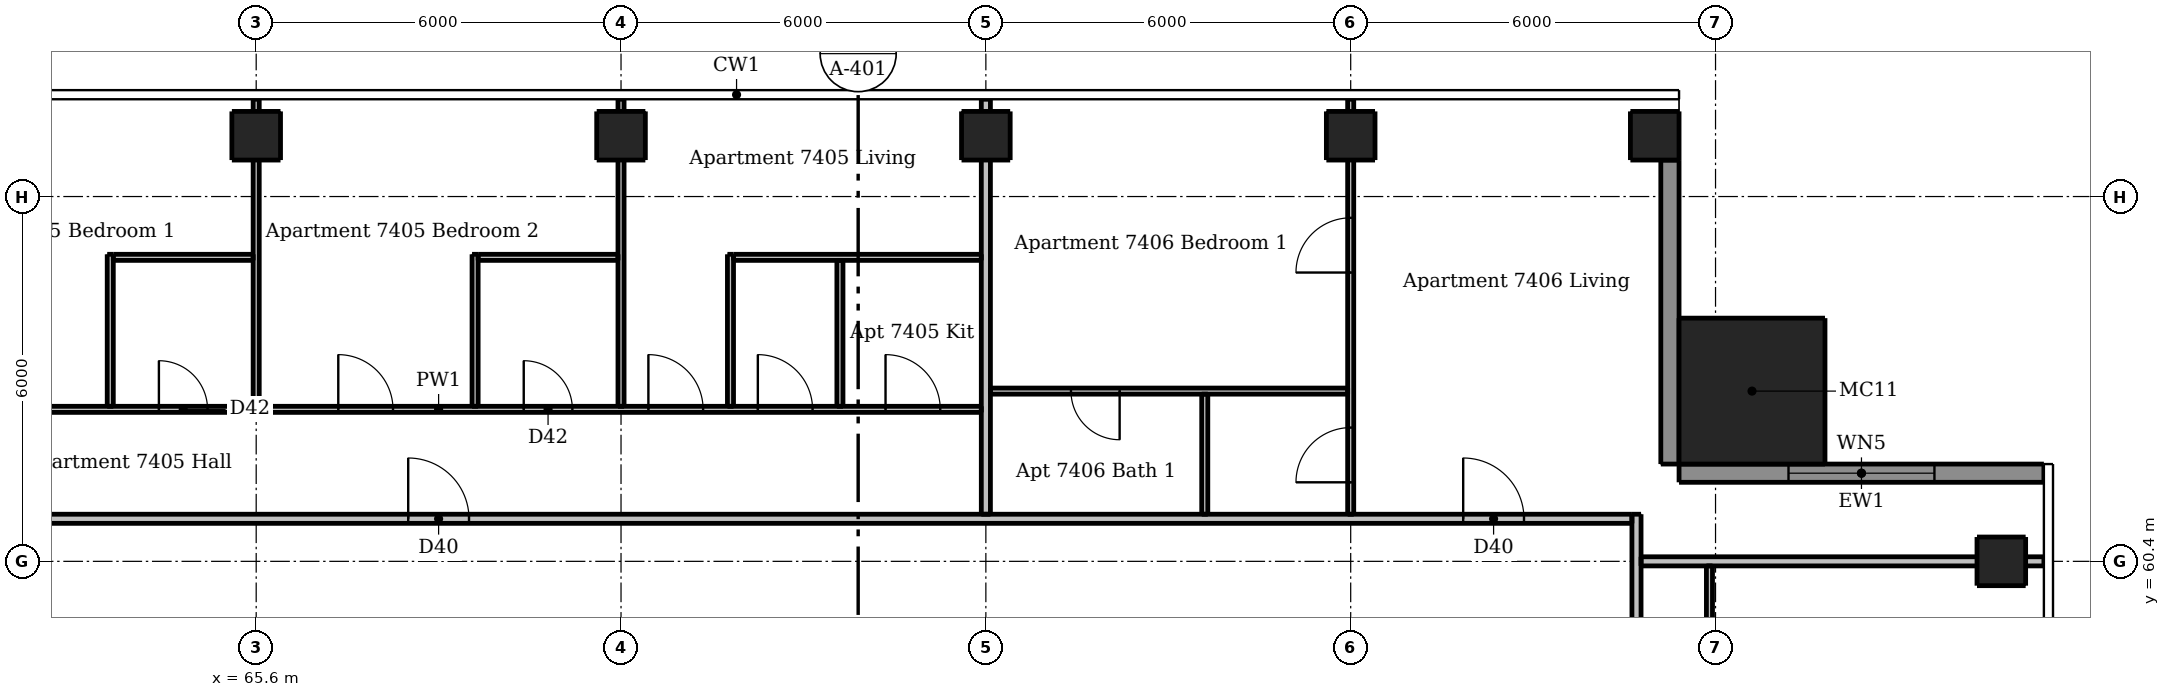
"""IFC4 building model, lengths in metres.
Left out: names, types, materials, properties, quantities, classifications, styles, units other than length and angle.
Written with IfcOpenShell. Run it as: python <this file> out.ifc"""

import sys

from ifc_helpers import new_model, si_unit, direction, frame, frame_2d, origin, origin_2d, place, context, subcontext, project, spatial, rectangle, extrude, element, fill, save


model = new_model("IFC4")
c1 = context("Model", 3, precision=1e-05, world=origin(), true_north=direction((0.0, 1.0)))
c2 = subcontext(c1, "Body", "Model", "MODEL_VIEW")
j1 = project(units=[si_unit("LENGTHUNIT", "METRE"), si_unit("PLANEANGLEUNIT", "RADIAN")], contexts=[c1])
p1 = place(None, origin())
s1 = spatial("IfcSite", under=j1, at=p1, CompositionType="ELEMENT")
p2 = place(p1, origin())
s2 = spatial("IfcBuilding", under=s1, at=p2, CompositionType="ELEMENT")
p3 = place(p2, frame((0.0, 0.0, 275.2)))
s3 = spatial("IfcBuildingStorey", under=s2, at=p3, CompositionType="ELEMENT", Elevation=275.2)
for number, where, z_axis, x_axis in (
    (1, (94.3, 60.4, 0.0), (0.0, 0.0, 1.0), (1.0, 0.0, 0.0)),
    (2, (65.6, 67.4, 0.0), (0.0, 0.0, 1.0), (1.0, 0.0, 0.0)),
    (3, (71.6, 67.4, 0.0), (0.0, 0.0, 1.0), (1.0, 0.0, 0.0)),
    (4, (77.6, 67.4, 0.0), (0.0, 0.0, 1.0), (1.0, 0.0, 0.0)),
    (5, (83.6, 67.4, 0.0), (0.0, 0.0, 1.0), (1.0, 0.0, 0.0)),
    (6, (88.6, 67.4, 0.0), (0.0, 0.0, 1.0), (1.0, 0.0, 0.0)),
):
    element("IfcColumn", number, at=place(p3, frame(where, z_axis=z_axis, x_axis=x_axis)), inside=s3, PredefinedType="COLUMN", context=c2, shape_type="SweptSolid", body=[
        extrude(rectangle(XDim=0.8, YDim=0.8, at=origin_2d()), origin(), (0.0, 0.0, 1.0), 3.05),
    ])
p4 = place(p3, frame((90.2, 63.2, 0.0), z_axis=(0.0, 0.0, 1.0), x_axis=(1.0, 0.0, 0.0)))
e7 = element("IfcColumn", 7, at=p4, inside=s3, PredefinedType="COLUMN", context=c2, shape_type="SweptSolid", body=[
    extrude(rectangle(XDim=2.4, YDim=2.4, at=origin_2d()), origin(), (0.0, 0.0, 1.0), 3.3),
])
p5 = place(p3, frame((95.0, 61.85, 0.0), z_axis=(0.0, 0.0, 1.0), x_axis=(-1.0, 0.0, 0.0)))
e8 = element("IfcWall", 8, at=p5, inside=s3, PredefinedType="SOLIDWALL", context=c2, shape_type="SweptSolid", body=[
    extrude(rectangle(XDim=6.0, YDim=0.3, at=frame_2d((3.0, 0.0))), origin(), (0.0, 0.0, 1.0), 3.05),
])
p6 = place(p5, frame((1.8, 0.0, 0.15)))
e9 = element("IfcOpeningElement", 9, at=p6, cuts=e8, PredefinedType="OPENING", context=c2, shape_type="SweptSolid", body=[
    extrude(rectangle(XDim=2.4, YDim=2.1, at=frame_2d((1.2, 1.05))), frame((0.0, 0.16, 0.0), z_axis=(0.0, -1.0, 0.0), x_axis=(1.0, 0.0, 0.0)), (0.0, 0.0, 1.0), 0.32),
])
p7 = place(p3, frame((88.85, 62.0, 0.0), z_axis=(0.0, 0.0, 1.0), x_axis=(0.0, 1.0, 0.0)))
e10 = element("IfcWall", 10, at=p7, inside=s3, PredefinedType="SOLIDWALL", context=c2, shape_type="SweptSolid", body=[
    extrude(rectangle(XDim=5.0, YDim=0.3, at=frame_2d((2.5, 0.0))), origin(), (0.0, 0.0, 1.0), 3.05),
])
p8 = place(p3, frame((63.2, 62.95, 0.0), z_axis=(0.0, 0.0, 1.0), x_axis=(0.0, 1.0, 0.0)))
e11 = element("IfcWall", 11, at=p8, inside=s3, PredefinedType="PARTITIONING", context=c2, shape_type="SweptSolid", body=[
    extrude(rectangle(XDim=2.5, YDim=0.1, at=frame_2d((1.25, 0.0))), origin(), (0.0, 0.0, 1.0), 3.05),
])
p9 = place(p3, frame((65.6, 62.95, 0.0), z_axis=(0.0, 0.0, 1.0), x_axis=(0.0, 1.0, 0.0)))
e12 = element("IfcWall", 12, at=p9, inside=s3, PredefinedType="PARTITIONING", context=c2, shape_type="SweptSolid", body=[
    extrude(rectangle(XDim=5.05, YDim=0.1, at=frame_2d((2.525, 0.0))), origin(), (0.0, 0.0, 1.0), 2.516),
])
p10 = place(p3, frame((69.2, 62.95, 0.0), z_axis=(0.0, 0.0, 1.0), x_axis=(0.0, 1.0, 0.0)))
e13 = element("IfcWall", 13, at=p10, inside=s3, PredefinedType="PARTITIONING", context=c2, shape_type="SweptSolid", body=[
    extrude(rectangle(XDim=2.5, YDim=0.1, at=frame_2d((1.25, 0.0))), origin(), (0.0, 0.0, 1.0), 3.05),
])
p11 = place(p3, frame((71.6, 62.95, 0.0), z_axis=(0.0, 0.0, 1.0), x_axis=(0.0, 1.0, 0.0)))
e14 = element("IfcWall", 14, at=p11, inside=s3, PredefinedType="PARTITIONING", context=c2, shape_type="SweptSolid", body=[
    extrude(rectangle(XDim=5.05, YDim=0.1, at=frame_2d((2.525, 0.0))), origin(), (0.0, 0.0, 1.0), 2.516),
])
p12 = place(p3, frame((73.4, 62.95, 0.0), z_axis=(0.0, 0.0, 1.0), x_axis=(0.0, 1.0, 0.0)))
e15 = element("IfcWall", 15, at=p12, inside=s3, PredefinedType="PARTITIONING", context=c2, shape_type="SweptSolid", body=[
    extrude(rectangle(XDim=2.5, YDim=0.1, at=frame_2d((1.25, 0.0))), origin(), (0.0, 0.0, 1.0), 3.05),
])
p13 = place(p3, frame((75.2, 62.95, 0.0), z_axis=(0.0, 0.0, 1.0), x_axis=(0.0, 1.0, 0.0)))
e16 = element("IfcWall", 16, at=p13, inside=s3, PredefinedType="PARTITIONING", context=c2, shape_type="SweptSolid", body=[
    extrude(rectangle(XDim=2.4, YDim=0.1, at=frame_2d((1.2, 0.0))), origin(), (0.0, 0.0, 1.0), 3.05),
])
p14 = place(p3, frame((81.2, 61.175, 0.0), z_axis=(0.0, 0.0, 1.0), x_axis=(0.0, 1.0, 0.0)))
e17 = element("IfcWall", 17, at=p14, inside=s3, PredefinedType="PARTITIONING", context=c2, shape_type="SweptSolid", body=[
    extrude(rectangle(XDim=1.975, YDim=0.1, at=frame_2d((0.987, 0.0))), origin(), (0.0, 0.0, 1.0), 3.05),
])
p15 = place(p3, frame((83.6, 61.175, 0.0), z_axis=(0.0, 0.0, 1.0), x_axis=(0.0, 1.0, 0.0)))
e18 = element("IfcWall", 18, at=p15, inside=s3, PredefinedType="PARTITIONING", context=c2, shape_type="SweptSolid", body=[
    extrude(rectangle(XDim=6.825, YDim=0.1, at=frame_2d((3.413, 0.0))), origin(), (0.0, 0.0, 1.0), 2.516),
])
p16 = place(p15, frame((0.525, 0.0, 0.0)))
e19 = element("IfcOpeningElement", 19, at=p16, cuts=e18, PredefinedType="OPENING", context=c2, shape_type="SweptSolid", body=[
    extrude(rectangle(XDim=0.9, YDim=2.1, at=frame_2d((0.45, 1.05))), frame((0.0, 0.06, 0.0), z_axis=(0.0, -1.0, 0.0), x_axis=(1.0, 0.0, 0.0)), (0.0, 0.0, 1.0), 0.12),
])
p17 = place(p15, frame((3.975, 0.0, 0.0)))
e20 = element("IfcOpeningElement", 20, at=p17, cuts=e18, PredefinedType="OPENING", context=c2, shape_type="SweptSolid", body=[
    extrude(rectangle(XDim=0.9, YDim=2.1, at=frame_2d((0.45, 1.05))), frame((0.0, 0.06, 0.0), z_axis=(0.0, -1.0, 0.0), x_axis=(1.0, 0.0, 0.0)), (0.0, 0.0, 1.0), 0.12),
])
p18 = place(p3, frame((89.5, 60.325, 0.0), z_axis=(0.0, 0.0, 1.0), x_axis=(0.0, -1.0, 0.0)))
e21 = element("IfcWall", 21, at=p18, inside=s3, PredefinedType="PARTITIONING", context=c2, shape_type="SweptSolid", body=[
    extrude(rectangle(XDim=17.85, YDim=0.1, at=frame_2d((8.925, 0.0))), origin(), (0.0, 0.0, 1.0), 3.05),
])
p19 = place(p18, frame((16.575, 0.0, 0.0)))
e22 = element("IfcOpeningElement", 22, at=p19, cuts=e21, PredefinedType="OPENING", context=c2, shape_type="SweptSolid", body=[
    extrude(rectangle(XDim=0.9, YDim=2.1, at=frame_2d((0.45, 1.05))), frame((0.0, 0.06, 0.0), z_axis=(0.0, -1.0, 0.0), x_axis=(1.0, 0.0, 0.0)), (0.0, 0.0, 1.0), 0.12),
])
p20 = place(p18, frame((12.675, 0.0, 0.0)))
e23 = element("IfcOpeningElement", 23, at=p20, cuts=e21, PredefinedType="OPENING", context=c2, shape_type="SweptSolid", body=[
    extrude(rectangle(XDim=0.9, YDim=2.1, at=frame_2d((0.45, 1.05))), frame((0.0, 0.06, 0.0), z_axis=(0.0, -1.0, 0.0), x_axis=(1.0, 0.0, 0.0)), (0.0, 0.0, 1.0), 0.12),
])
p21 = place(p18, frame((14.775, 0.0, 0.0)))
e24 = element("IfcOpeningElement", 24, at=p21, cuts=e21, PredefinedType="OPENING", context=c2, shape_type="SweptSolid", body=[
    extrude(rectangle(XDim=0.9, YDim=2.1, at=frame_2d((0.45, 1.05))), frame((0.0, 0.06, 0.0), z_axis=(0.0, -1.0, 0.0), x_axis=(1.0, 0.0, 0.0)), (0.0, 0.0, 1.0), 0.12),
])
p22 = place(p18, frame((7.275, 0.0, 0.0)))
e25 = element("IfcOpeningElement", 25, at=p22, cuts=e21, PredefinedType="OPENING", context=c2, shape_type="SweptSolid", body=[
    extrude(rectangle(XDim=0.9, YDim=2.1, at=frame_2d((0.45, 1.05))), frame((0.0, 0.06, 0.0), z_axis=(0.0, -1.0, 0.0), x_axis=(1.0, 0.0, 0.0)), (0.0, 0.0, 1.0), 0.12),
])
p23 = place(p18, frame((1.275, 0.0, 0.0)))
e26 = element("IfcOpeningElement", 26, at=p23, cuts=e21, PredefinedType="OPENING", context=c2, shape_type="SweptSolid", body=[
    extrude(rectangle(XDim=0.9, YDim=2.1, at=frame_2d((0.45, 1.05))), frame((0.0, 0.06, 0.0), z_axis=(0.0, -1.0, 0.0), x_axis=(1.0, 0.0, 0.0)), (0.0, 0.0, 1.0), 0.12),
])
p24 = place(p18, frame((10.325, 0.0, 0.0)))
e27 = element("IfcOpeningElement", 27, at=p24, cuts=e21, PredefinedType="OPENING", context=c2, shape_type="SweptSolid", body=[
    extrude(rectangle(XDim=0.8, YDim=2.1, at=frame_2d((0.4, 1.05))), frame((0.0, 0.06, 0.0), z_axis=(0.0, -1.0, 0.0), x_axis=(1.0, 0.0, 0.0)), (0.0, 0.0, 1.0), 0.12),
])
p25 = place(p18, frame((4.325, 0.0, 0.0)))
e28 = element("IfcOpeningElement", 28, at=p25, cuts=e21, PredefinedType="OPENING", context=c2, shape_type="SweptSolid", body=[
    extrude(rectangle(XDim=0.8, YDim=2.1, at=frame_2d((0.4, 1.05))), frame((0.0, 0.06, 0.0), z_axis=(0.0, -1.0, 0.0), x_axis=(1.0, 0.0, 0.0)), (0.0, 0.0, 1.0), 0.12),
])
for number, where, z_axis, x_axis in (
    (29, (63.25, 65.4, 0.0), (0.0, 0.0, 1.0), (1.0, 0.0, 0.0)),
    (30, (69.25, 65.4, 0.0), (0.0, 0.0, 1.0), (1.0, 0.0, 0.0)),
):
    element("IfcWall", number, at=place(p3, frame(where, z_axis=z_axis, x_axis=x_axis)), inside=s3, PredefinedType="PARTITIONING", context=c2, shape_type="SweptSolid", body=[
        extrude(rectangle(XDim=2.3, YDim=0.1, at=frame_2d((1.15, 0.0))), origin(), (0.0, 0.0, 1.0), 3.05),
    ])
p26 = place(p3, frame((73.45, 65.4, 0.0), z_axis=(0.0, 0.0, 1.0), x_axis=(1.0, 0.0, 0.0)))
e31 = element("IfcWall", 31, at=p26, inside=s3, PredefinedType="PARTITIONING", context=c2, shape_type="SweptSolid", body=[
    extrude(rectangle(XDim=4.075, YDim=0.1, at=frame_2d((2.038, 0.0))), origin(), (0.0, 0.0, 1.0), 3.05),
])
p27 = place(p3, frame((83.55, 63.2, 0.0), z_axis=(0.0, 0.0, 1.0), x_axis=(-1.0, 0.0, 0.0)))
e32 = element("IfcWall", 32, at=p27, inside=s3, PredefinedType="PARTITIONING", context=c2, shape_type="SweptSolid", body=[
    extrude(rectangle(XDim=5.875, YDim=0.1, at=frame_2d((2.938, 0.0))), origin(), (0.0, 0.0, 1.0), 3.05),
])
p28 = place(p27, frame((3.75, 0.0, 0.0)))
e33 = element("IfcOpeningElement", 33, at=p28, cuts=e32, PredefinedType="OPENING", context=c2, shape_type="SweptSolid", body=[
    extrude(rectangle(XDim=0.8, YDim=2.1, at=frame_2d((0.4, 1.05))), frame((0.0, 0.06, 0.0), z_axis=(0.0, -1.0, 0.0), x_axis=(1.0, 0.0, 0.0)), (0.0, 0.0, 1.0), 0.12),
])
p29 = place(p3, frame((59.675, 62.9, 0.0), z_axis=(0.0, 0.0, 1.0), x_axis=(1.0, 0.0, 0.0)))
e34 = element("IfcWall", 34, at=p29, inside=s3, PredefinedType="PARTITIONING", context=c2, shape_type="SweptSolid", body=[
    extrude(rectangle(XDim=17.85, YDim=0.1, at=frame_2d((8.925, 0.0))), origin(), (0.0, 0.0, 1.0), 3.05),
])
p30 = place(p29, frame((12.375, 0.0, 0.0)))
e35 = element("IfcOpeningElement", 35, at=p30, cuts=e34, PredefinedType="OPENING", context=c2, shape_type="SweptSolid", body=[
    extrude(rectangle(XDim=0.9, YDim=2.1, at=frame_2d((0.45, 1.05))), frame((0.0, 0.06, 0.0), z_axis=(0.0, -1.0, 0.0), x_axis=(1.0, 0.0, 0.0)), (0.0, 0.0, 1.0), 0.12),
])
p31 = place(p29, frame((16.275, 0.0, 0.0)))
e36 = element("IfcOpeningElement", 36, at=p31, cuts=e34, PredefinedType="OPENING", context=c2, shape_type="SweptSolid", body=[
    extrude(rectangle(XDim=0.9, YDim=2.1, at=frame_2d((0.45, 1.05))), frame((0.0, 0.06, 0.0), z_axis=(0.0, -1.0, 0.0), x_axis=(1.0, 0.0, 0.0)), (0.0, 0.0, 1.0), 0.12),
])
p32 = place(p29, frame((14.175, 0.0, 0.0)))
e37 = element("IfcOpeningElement", 37, at=p32, cuts=e34, PredefinedType="OPENING", context=c2, shape_type="SweptSolid", body=[
    extrude(rectangle(XDim=0.9, YDim=2.1, at=frame_2d((0.45, 1.05))), frame((0.0, 0.06, 0.0), z_axis=(0.0, -1.0, 0.0), x_axis=(1.0, 0.0, 0.0)), (0.0, 0.0, 1.0), 0.12),
])
p33 = place(p29, frame((1.275, 0.0, 0.0)))
e38 = element("IfcOpeningElement", 38, at=p33, cuts=e34, PredefinedType="OPENING", context=c2, shape_type="SweptSolid", body=[
    extrude(rectangle(XDim=0.9, YDim=2.1, at=frame_2d((0.45, 1.05))), frame((0.0, 0.06, 0.0), z_axis=(0.0, -1.0, 0.0), x_axis=(1.0, 0.0, 0.0)), (0.0, 0.0, 1.0), 0.12),
])
p34 = place(p29, frame((7.275, 0.0, 0.0)))
e39 = element("IfcOpeningElement", 39, at=p34, cuts=e34, PredefinedType="OPENING", context=c2, shape_type="SweptSolid", body=[
    extrude(rectangle(XDim=0.9, YDim=2.1, at=frame_2d((0.45, 1.05))), frame((0.0, 0.06, 0.0), z_axis=(0.0, -1.0, 0.0), x_axis=(1.0, 0.0, 0.0)), (0.0, 0.0, 1.0), 0.12),
])
p35 = place(p29, frame((4.325, 0.0, 0.0)))
e40 = element("IfcOpeningElement", 40, at=p35, cuts=e34, PredefinedType="OPENING", context=c2, shape_type="SweptSolid", body=[
    extrude(rectangle(XDim=0.8, YDim=2.1, at=frame_2d((0.4, 1.05))), frame((0.0, 0.06, 0.0), z_axis=(0.0, -1.0, 0.0), x_axis=(1.0, 0.0, 0.0)), (0.0, 0.0, 1.0), 0.12),
])
p36 = place(p29, frame((10.325, 0.0, 0.0)))
e41 = element("IfcOpeningElement", 41, at=p36, cuts=e34, PredefinedType="OPENING", context=c2, shape_type="SweptSolid", body=[
    extrude(rectangle(XDim=0.8, YDim=2.1, at=frame_2d((0.4, 1.05))), frame((0.0, 0.06, 0.0), z_axis=(0.0, -1.0, 0.0), x_axis=(1.0, 0.0, 0.0)), (0.0, 0.0, 1.0), 0.12),
])
p37 = place(p3, frame((77.6, 61.175, 0.0), z_axis=(0.0, 0.0, 1.0), x_axis=(0.0, 1.0, 0.0)))
e42 = element("IfcWall", 42, at=p37, inside=s3, PredefinedType="PARTITIONING", context=c2, shape_type="SweptSolid", body=[
    extrude(rectangle(XDim=6.825, YDim=0.15, at=frame_2d((3.413, 0.0))), origin(), (0.0, 0.0, 1.0), 2.516),
])
p38 = place(p3, frame((88.3, 61.175, 0.0), z_axis=(0.0, 0.0, 1.0), x_axis=(0.0, -1.0, 0.0)))
e43 = element("IfcWall", 43, at=p38, inside=s3, PredefinedType="PARTITIONING", context=c2, shape_type="SweptSolid", body=[
    extrude(rectangle(XDim=29.4, YDim=0.15, at=frame_2d((14.7, 0.0))), origin(), (0.0, 0.0, 1.0), 3.05),
])
p39 = place(p38, frame((27.175, 0.0, 0.0)))
e44 = element("IfcOpeningElement", 44, at=p39, cuts=e43, PredefinedType="OPENING", context=c2, shape_type="SweptSolid", body=[
    extrude(rectangle(XDim=1.0, YDim=2.1, at=frame_2d((0.5, 1.05))), frame((0.0, 0.085, 0.0), z_axis=(0.0, -1.0, 0.0), x_axis=(1.0, 0.0, 0.0)), (0.0, 0.0, 1.0), 0.17),
])
p40 = place(p38, frame((9.275, 0.0, 0.0)))
e45 = element("IfcOpeningElement", 45, at=p40, cuts=e43, PredefinedType="OPENING", context=c2, shape_type="SweptSolid", body=[
    extrude(rectangle(XDim=1.0, YDim=2.1, at=frame_2d((0.5, 1.05))), frame((0.0, 0.085, 0.0), z_axis=(0.0, -1.0, 0.0), x_axis=(1.0, 0.0, 0.0)), (0.0, 0.0, 1.0), 0.17),
])
p41 = place(p3, frame((58.975, 61.1, 0.0), z_axis=(0.0, 0.0, 1.0), x_axis=(1.0, 0.0, 0.0)))
e46 = element("IfcWall", 46, at=p41, inside=s3, PredefinedType="PARTITIONING", context=c2, shape_type="SweptSolid", body=[
    extrude(rectangle(XDim=29.25, YDim=0.15, at=frame_2d((14.625, 0.0))), origin(), (0.0, 0.0, 1.0), 3.05),
])
p42 = place(p41, frame((9.125, 0.0, 0.0)))
e47 = element("IfcOpeningElement", 47, at=p42, cuts=e46, PredefinedType="OPENING", context=c2, shape_type="SweptSolid", body=[
    extrude(rectangle(XDim=1.0, YDim=2.1, at=frame_2d((0.5, 1.05))), frame((0.0, 0.085, 0.0), z_axis=(0.0, -1.0, 0.0), x_axis=(1.0, 0.0, 0.0)), (0.0, 0.0, 1.0), 0.17),
])
p43 = place(p41, frame((26.475, 0.0, 0.0)))
e48 = element("IfcOpeningElement", 48, at=p43, cuts=e46, PredefinedType="OPENING", context=c2, shape_type="SweptSolid", body=[
    extrude(rectangle(XDim=1.0, YDim=2.1, at=frame_2d((0.5, 1.05))), frame((0.0, 0.085, 0.0), z_axis=(0.0, -1.0, 0.0), x_axis=(1.0, 0.0, 0.0)), (0.0, 0.0, 1.0), 0.17),
])
p44 = place(p3, frame((88.375, 60.4, 0.0), z_axis=(0.0, 0.0, 1.0), x_axis=(1.0, 0.0, 0.0)))
e49 = element("IfcWall", 49, at=p44, inside=s3, PredefinedType="PARTITIONING", context=c2, shape_type="SweptSolid", body=[
    extrude(rectangle(XDim=6.625, YDim=0.15, at=frame_2d((3.312, 0.0))), origin(), (0.0, 0.0, 1.0), 2.647),
])
p45 = place(p6, origin())
e50 = element("IfcWindow", 50, at=p45, inside=s3, PartitioningType="DOUBLE_PANEL_VERTICAL", PredefinedType="WINDOW", context=c2, shape_type="SweptSolid", body=[
    extrude(rectangle(XDim=2.4, YDim=2.1, at=frame_2d((1.2, 1.05))), frame((0.0, 0.03, 0.0), z_axis=(0.0, -1.0, 0.0), x_axis=(1.0, 0.0, 0.0)), (0.0, 0.0, 1.0), 0.06),
])
fill(e9, e50)
p46 = place(p42, origin())
e51 = element("IfcDoor", 51, at=p46, inside=s3, OperationType="SINGLE_SWING_LEFT", PredefinedType="DOOR", context=c2, shape_type="SweptSolid", body=[
    extrude(rectangle(XDim=1.0, YDim=2.1, at=frame_2d((0.5, 1.05))), frame((0.0, 0.025, 0.0), z_axis=(0.0, -1.0, 0.0), x_axis=(1.0, 0.0, 0.0)), (0.0, 0.0, 1.0), 0.05),
])
fill(e47, e51)
p47 = place(p30, origin())
e52 = element("IfcDoor", 52, at=p47, inside=s3, OperationType="SINGLE_SWING_LEFT", PredefinedType="DOOR", context=c2, shape_type="SweptSolid", body=[
    extrude(rectangle(XDim=0.9, YDim=2.1, at=frame_2d((0.45, 1.05))), frame((0.0, 0.025, 0.0), z_axis=(0.0, -1.0, 0.0), x_axis=(1.0, 0.0, 0.0)), (0.0, 0.0, 1.0), 0.05),
])
fill(e35, e52)
p48 = place(p31, origin())
e53 = element("IfcDoor", 53, at=p48, inside=s3, OperationType="SINGLE_SWING_LEFT", PredefinedType="DOOR", context=c2, shape_type="SweptSolid", body=[
    extrude(rectangle(XDim=0.9, YDim=2.1, at=frame_2d((0.45, 1.05))), frame((0.0, 0.025, 0.0), z_axis=(0.0, -1.0, 0.0), x_axis=(1.0, 0.0, 0.0)), (0.0, 0.0, 1.0), 0.05),
])
fill(e36, e53)
p49 = place(p32, origin())
e54 = element("IfcDoor", 54, at=p49, inside=s3, OperationType="SINGLE_SWING_LEFT", PredefinedType="DOOR", context=c2, shape_type="SweptSolid", body=[
    extrude(rectangle(XDim=0.9, YDim=2.1, at=frame_2d((0.45, 1.05))), frame((0.0, 0.025, 0.0), z_axis=(0.0, -1.0, 0.0), x_axis=(1.0, 0.0, 0.0)), (0.0, 0.0, 1.0), 0.05),
])
fill(e37, e54)
p50 = place(p34, origin())
e55 = element("IfcDoor", 55, at=p50, inside=s3, OperationType="SINGLE_SWING_LEFT", PredefinedType="DOOR", context=c2, shape_type="SweptSolid", body=[
    extrude(rectangle(XDim=0.9, YDim=2.1, at=frame_2d((0.45, 1.05))), frame((0.0, 0.025, 0.0), z_axis=(0.0, -1.0, 0.0), x_axis=(1.0, 0.0, 0.0)), (0.0, 0.0, 1.0), 0.05),
])
fill(e39, e55)
p51 = place(p35, origin())
e56 = element("IfcDoor", 56, at=p51, inside=s3, OperationType="SINGLE_SWING_LEFT", PredefinedType="DOOR", context=c2, shape_type="SweptSolid", body=[
    extrude(rectangle(XDim=0.8, YDim=2.1, at=frame_2d((0.4, 1.05))), frame((0.0, 0.025, 0.0), z_axis=(0.0, -1.0, 0.0), x_axis=(1.0, 0.0, 0.0)), (0.0, 0.0, 1.0), 0.05),
])
fill(e40, e56)
p52 = place(p36, origin())
e57 = element("IfcDoor", 57, at=p52, inside=s3, OperationType="SINGLE_SWING_LEFT", PredefinedType="DOOR", context=c2, shape_type="SweptSolid", body=[
    extrude(rectangle(XDim=0.8, YDim=2.1, at=frame_2d((0.4, 1.05))), frame((0.0, 0.025, 0.0), z_axis=(0.0, -1.0, 0.0), x_axis=(1.0, 0.0, 0.0)), (0.0, 0.0, 1.0), 0.05),
])
fill(e41, e57)
p53 = place(p43, origin())
e58 = element("IfcDoor", 58, at=p53, inside=s3, OperationType="SINGLE_SWING_LEFT", PredefinedType="DOOR", context=c2, shape_type="SweptSolid", body=[
    extrude(rectangle(XDim=1.0, YDim=2.1, at=frame_2d((0.5, 1.05))), frame((0.0, 0.025, 0.0), z_axis=(0.0, -1.0, 0.0), x_axis=(1.0, 0.0, 0.0)), (0.0, 0.0, 1.0), 0.05),
])
fill(e48, e58)
p54 = place(p16, origin())
e59 = element("IfcDoor", 59, at=p54, inside=s3, OperationType="SINGLE_SWING_LEFT", PredefinedType="DOOR", context=c2, shape_type="SweptSolid", body=[
    extrude(rectangle(XDim=0.9, YDim=2.1, at=frame_2d((0.45, 1.05))), frame((0.0, 0.025, 0.0), z_axis=(0.0, -1.0, 0.0), x_axis=(1.0, 0.0, 0.0)), (0.0, 0.0, 1.0), 0.05),
])
fill(e19, e59)
p55 = place(p17, origin())
e60 = element("IfcDoor", 60, at=p55, inside=s3, OperationType="SINGLE_SWING_LEFT", PredefinedType="DOOR", context=c2, shape_type="SweptSolid", body=[
    extrude(rectangle(XDim=0.9, YDim=2.1, at=frame_2d((0.45, 1.05))), frame((0.0, 0.025, 0.0), z_axis=(0.0, -1.0, 0.0), x_axis=(1.0, 0.0, 0.0)), (0.0, 0.0, 1.0), 0.05),
])
fill(e20, e60)
p56 = place(p28, origin())
e61 = element("IfcDoor", 61, at=p56, inside=s3, OperationType="SINGLE_SWING_LEFT", PredefinedType="DOOR", context=c2, shape_type="SweptSolid", body=[
    extrude(rectangle(XDim=0.8, YDim=2.1, at=frame_2d((0.4, 1.05))), frame((0.0, 0.025, 0.0), z_axis=(0.0, -1.0, 0.0), x_axis=(1.0, 0.0, 0.0)), (0.0, 0.0, 1.0), 0.05),
])
fill(e33, e61)
save(model, sys.argv[1])
